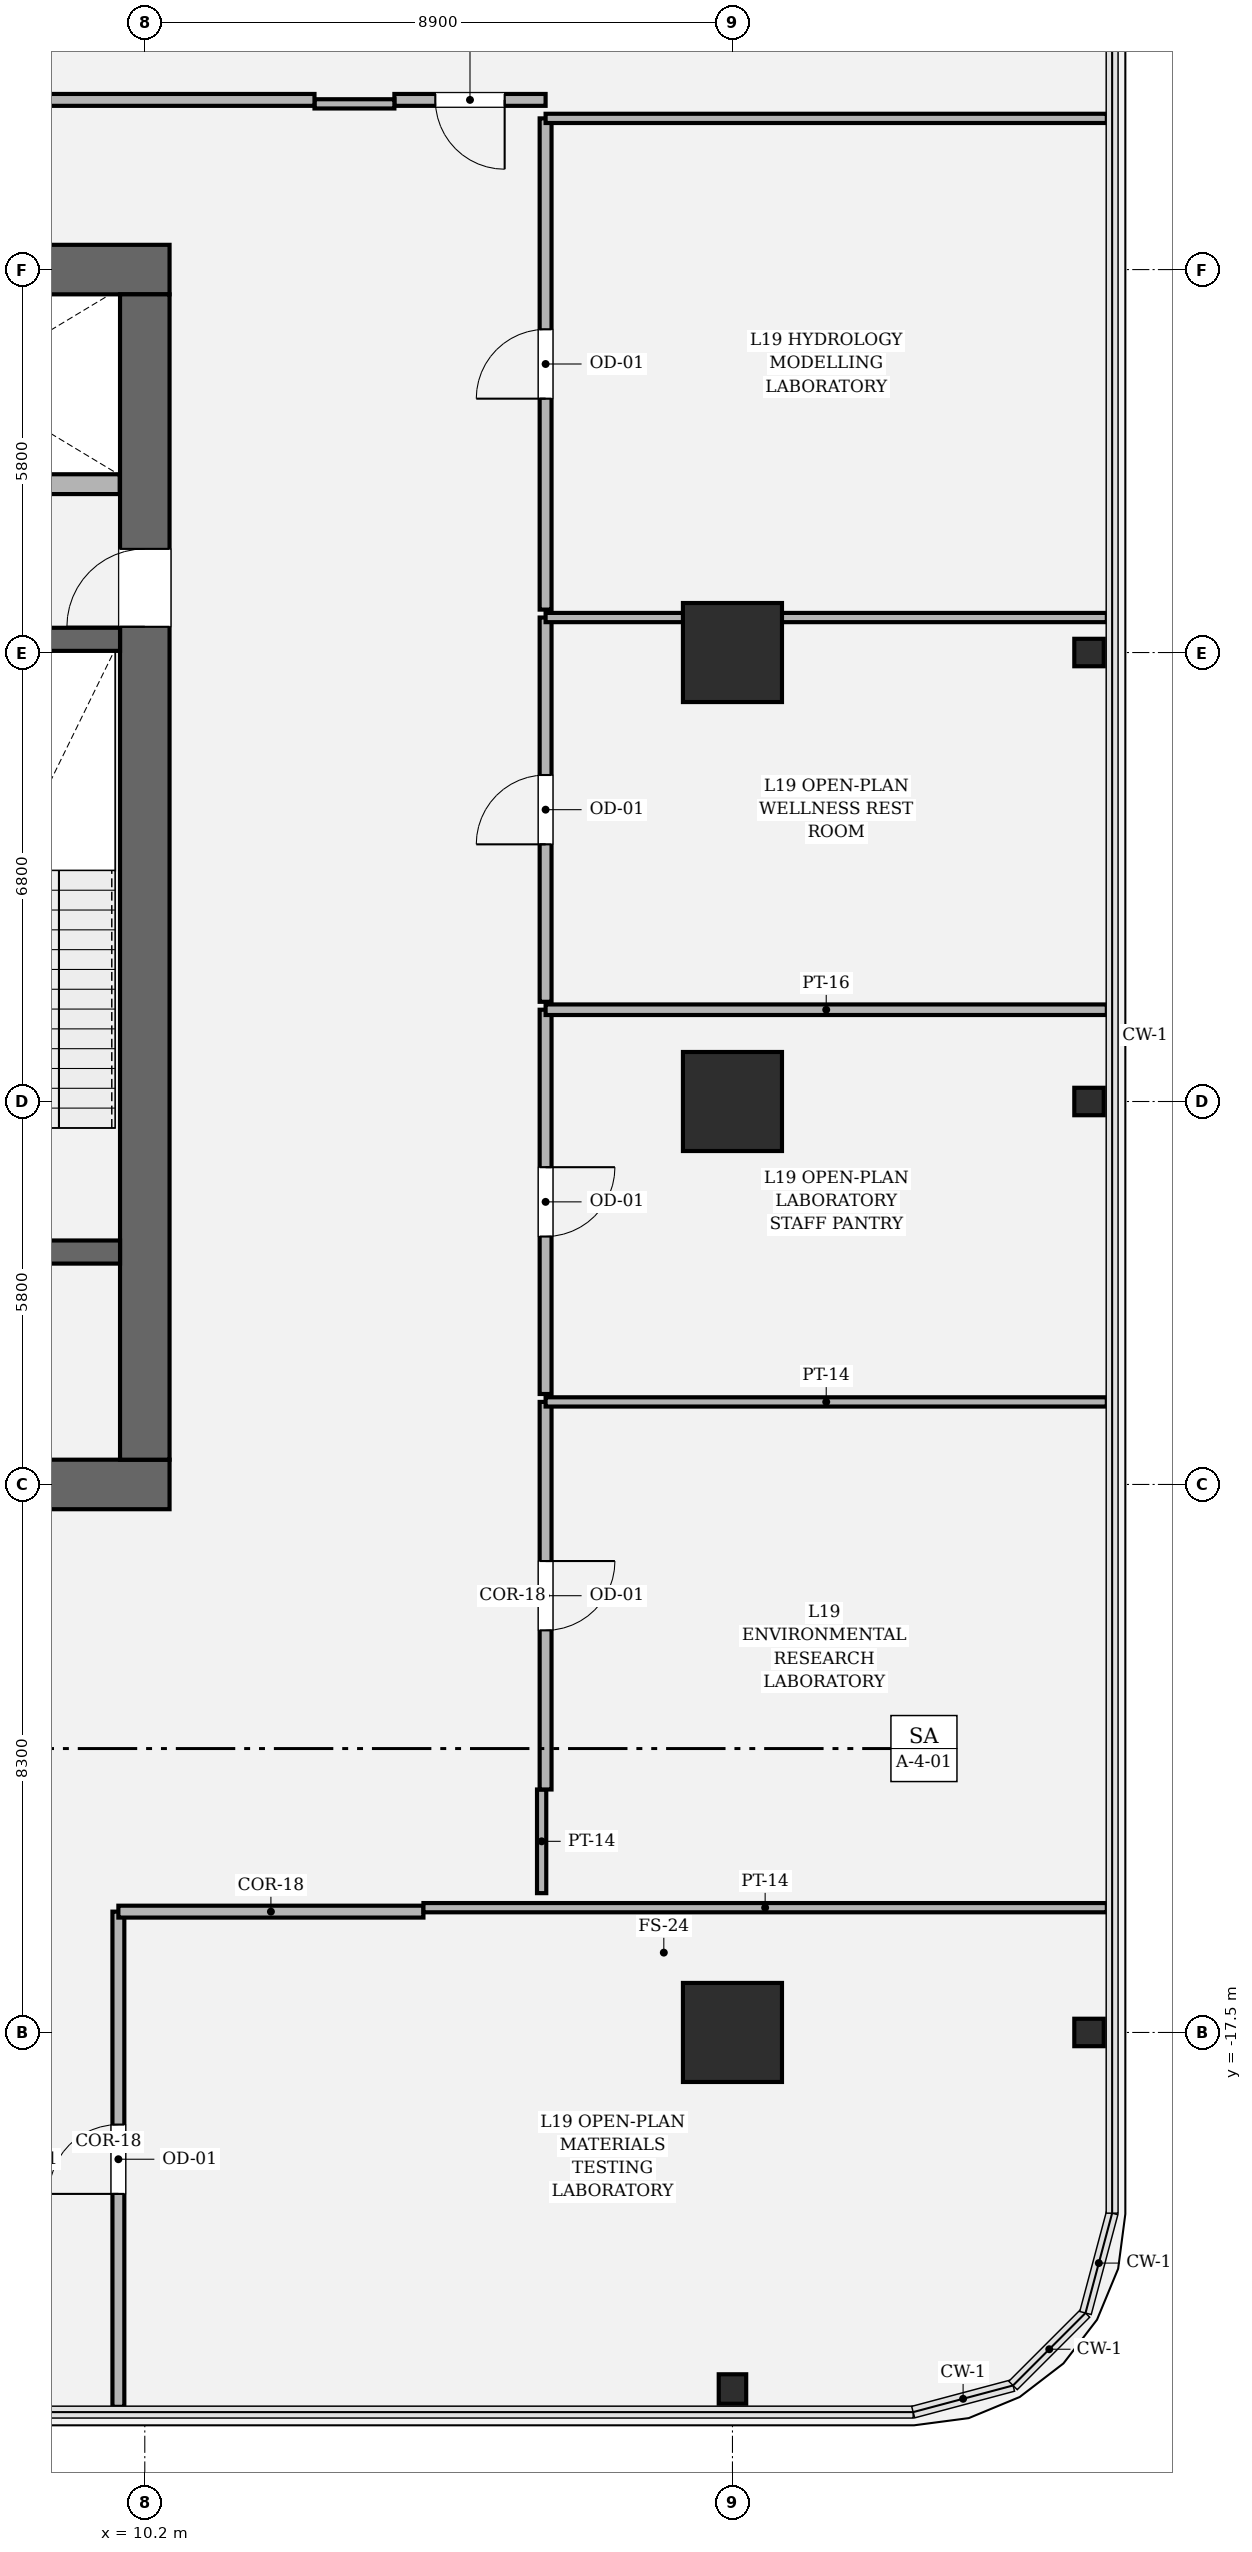
"""IFC4 building model, lengths in metres.
Left out: names, types, materials, properties, quantities, classifications, styles, units other than length and angle.
Written with IfcOpenShell. Run it as: python <this file> out.ifc"""

import sys

from ifc_helpers import new_model, si_unit, direction, frame, frame_2d, origin, origin_2d, place, context, subcontext, project, spatial, rectangle, hollow_rectangle, i_section, extrude, element, fill, save


model = new_model("IFC4")
c1 = context("Model", 3, precision=1e-05, world=origin(), true_north=direction((0.0, 1.0)))
c2 = subcontext(c1, "Body", "Model", "MODEL_VIEW")
j1 = project(units=[si_unit("LENGTHUNIT", "METRE"), si_unit("PLANEANGLEUNIT", "RADIAN")], contexts=[c1])
p1 = place(None, origin())
s1 = spatial("IfcSite", under=j1, at=p1, CompositionType="ELEMENT")
p2 = place(p1, origin())
s2 = spatial("IfcBuilding", under=s1, at=p2, CompositionType="ELEMENT")
p3 = place(p2, frame((0.0, 0.0, 84.9)))
s3 = spatial("IfcBuildingStorey", under=s2, at=p3, CompositionType="ELEMENT", Elevation=84.9)
p4 = place(p3, frame((10.575, -9.2, 0.0), z_axis=(0.0, 0.0, 1.0), x_axis=(-1.0, 0.0, 0.0)))
e1 = element("IfcWall", 1, at=p4, inside=s3, PredefinedType="SHEAR", context=c2, shape_type="SweptSolid", body=[
    extrude(rectangle(XDim=21.15, YDim=0.75, at=frame_2d((10.575, 0.0))), origin(), (0.0, 0.0, 1.0), 4.05),
])
p5 = place(p4, frame((2.85, 0.0, 0.0)))
e2 = element("IfcOpeningElement", 2, at=p5, cuts=e1, PredefinedType="OPENING", context=c2, shape_type="SweptSolid", body=[
    extrude(rectangle(XDim=1.25, YDim=2.25, at=frame_2d((0.625, 1.125))), frame((0.0, 0.385, 0.0), z_axis=(0.0, -1.0, 0.0), x_axis=(1.0, 0.0, 0.0)), (0.0, 0.0, 1.0), 0.77),
])
p6 = place(p4, frame((17.05, 0.0, 0.0)))
e3 = element("IfcOpeningElement", 3, at=p6, cuts=e1, PredefinedType="OPENING", context=c2, shape_type="SweptSolid", body=[
    extrude(rectangle(XDim=1.25, YDim=2.25, at=frame_2d((0.625, 1.125))), frame((0.0, 0.385, 0.0), z_axis=(0.0, -1.0, 0.0), x_axis=(1.0, 0.0, 0.0)), (0.0, 0.0, 1.0), 0.77),
])
p7 = place(p3, frame((-10.575, 9.2, 0.0), z_axis=(0.0, 0.0, 1.0), x_axis=(1.0, 0.0, 0.0)))
e4 = element("IfcWall", 4, at=p7, inside=s3, PredefinedType="SHEAR", context=c2, shape_type="SweptSolid", body=[
    extrude(rectangle(XDim=21.15, YDim=0.75, at=frame_2d((10.575, 0.0))), origin(), (0.0, 0.0, 1.0), 4.05),
])
p8 = place(p3, frame((10.2, 8.825, 0.0), z_axis=(0.0, 0.0, 1.0), x_axis=(0.0, -1.0, 0.0)))
e5 = element("IfcWall", 5, at=p8, inside=s3, PredefinedType="SHEAR", context=c2, shape_type="SweptSolid", body=[
    extrude(rectangle(XDim=17.65, YDim=0.75, at=frame_2d((8.825, 0.0))), origin(), (0.0, 0.0, 1.0), 4.05),
])
p9 = place(p8, frame((3.855, 0.0, 0.0)))
e6 = element("IfcOpeningElement", 6, at=p9, cuts=e5, PredefinedType="OPENING", context=c2, shape_type="SweptSolid", body=[
    extrude(rectangle(XDim=1.18, YDim=2.2, at=frame_2d((0.59, 1.1))), frame((0.0, 0.385, 0.0), z_axis=(0.0, -1.0, 0.0), x_axis=(1.0, 0.0, 0.0)), (0.0, 0.0, 1.0), 0.77),
])
p10 = place(p3, frame((4.65, -5.68, 0.0), z_axis=(0.0, 0.0, 1.0), x_axis=(1.0, 0.0, 0.0)))
e7 = element("IfcWall", 7, at=p10, inside=s3, PredefinedType="SOLIDWALL", context=c2, shape_type="SweptSolid", body=[
    extrude(rectangle(XDim=5.175, YDim=0.35, at=frame_2d((2.587, 0.0))), origin(), (0.0, 0.0, 1.0), 4.05),
])
p11 = place(p10, frame((2.71, 0.0, 0.0)))
e8 = element("IfcOpeningElement", 8, at=p11, cuts=e7, PredefinedType="OPENING", context=c2, shape_type="SweptSolid", body=[
    extrude(rectangle(XDim=1.18, YDim=2.2, at=frame_2d((0.59, 1.1))), frame((0.0, 0.185, 0.0), z_axis=(0.0, -1.0, 0.0), x_axis=(1.0, 0.0, 0.0)), (0.0, 0.0, 1.0), 0.37),
])
p12 = place(p3, frame((4.65, 3.6, 0.0), z_axis=(0.0, 0.0, 1.0), x_axis=(1.0, 0.0, 0.0)))
e9 = element("IfcWall", 9, at=p12, inside=s3, PredefinedType="SOLIDWALL", context=c2, shape_type="SweptSolid", body=[
    extrude(rectangle(XDim=5.175, YDim=0.35, at=frame_2d((2.587, 0.0))), origin(), (0.0, 0.0, 1.0), 4.05),
])
for number, where, z_axis, x_axis in (
    (10, (19.1, -17.5, 0.0), (0.0, 0.0, 1.0), (1.0, 0.0, 0.0)),
    (11, (19.1, -3.4, 0.0), (0.0, 0.0, 1.0), (1.0, 0.0, 0.0)),
    (12, (19.1, 3.4, 0.0), (0.0, 0.0, 1.0), (1.0, 0.0, 0.0)),
):
    element("IfcColumn", number, at=place(p3, frame(where, z_axis=z_axis, x_axis=x_axis)), inside=s3, PredefinedType="COLUMN", context=c2, shape_type="SweptSolid", body=[
        extrude(hollow_rectangle(XDim=1.5, YDim=1.5, WallThickness=0.045, at=origin_2d()), origin(), (0.0, 0.0, 1.0), 4.05),
    ])
for number, where, z_axis, x_axis in (
    (13, (19.1, -22.9, 0.0), (0.0, 0.0, 1.0), (1.0, 0.0, 0.0)),
    (14, (24.5, -17.5, 0.0), (0.0, 0.0, 1.0), (0.0, 1.0, 0.0)),
    (15, (24.5, -3.4, 0.0), (0.0, 0.0, 1.0), (0.0, 1.0, 0.0)),
    (16, (24.5, 3.4, 0.0), (0.0, 0.0, 1.0), (0.0, 1.0, 0.0)),
):
    element("IfcColumn", number, at=place(p3, frame(where, z_axis=z_axis, x_axis=x_axis)), inside=s3, PredefinedType="COLUMN", context=c2, shape_type="SweptSolid", body=[
        extrude(i_section(OverallWidth=0.416, OverallDepth=0.446, WebThickness=0.039, FlangeThickness=0.062, FilletRadius=0.018, at=origin_2d()), origin(), (0.0, 0.0, 1.0), 4.048),
    ])
p13 = place(p3, frame((5.06, 5.95, 0.0), z_axis=(0.0, 0.0, 1.0), x_axis=(1.0, 0.0, 0.0)))
e17 = element("IfcWall", 17, at=p13, inside=s3, PredefinedType="SOLIDWALL", context=c2, shape_type="SweptSolid", body=[
    extrude(rectangle(XDim=4.76, YDim=0.3, at=frame_2d((2.38, 0.0))), origin(), (0.0, 0.0, 1.0), 3.81),
])
p14 = place(p3, frame((9.8, -23.17, 0.0), z_axis=(0.0, 0.0, 1.0), x_axis=(0.0, 1.0, 0.0)))
e18 = element("IfcWall", 18, at=p14, inside=s3, PredefinedType="PARTITIONING", context=c2, shape_type="SweptSolid", body=[
    extrude(rectangle(XDim=7.5, YDim=0.18, at=frame_2d((3.75, 0.0))), origin(), (0.0, 0.0, 1.0), 2.524),
])
p15 = place(p14, frame((3.225, 0.0, 0.0)))
e19 = element("IfcOpeningElement", 19, at=p15, cuts=e18, PredefinedType="OPENING", context=c2, shape_type="SweptSolid", body=[
    extrude(rectangle(XDim=1.05, YDim=2.2, at=frame_2d((0.525, 1.1))), frame((0.0, 0.1, 0.0), z_axis=(0.0, -1.0, 0.0), x_axis=(1.0, 0.0, 0.0)), (0.0, 0.0, 1.0), 0.2),
])
p16 = place(p3, frame((9.8, -15.67, 0.0), z_axis=(0.0, 0.0, 1.0), x_axis=(1.0, 0.0, 0.0)))
e20 = element("IfcWall", 20, at=p16, inside=s3, PredefinedType="PARTITIONING", context=c2, shape_type="SweptSolid", body=[
    extrude(rectangle(XDim=4.62, YDim=0.18, at=frame_2d((2.31, 0.0))), origin(), (0.0, 0.0, 1.0), 3.104),
])
p17 = place(p3, frame((14.42, -15.61, 0.0), z_axis=(0.0, 0.0, 1.0), x_axis=(1.0, 0.0, 0.0)))
e21 = element("IfcWall", 21, at=p17, inside=s3, PredefinedType="PARTITIONING", context=c2, shape_type="SweptSolid", body=[
    extrude(rectangle(XDim=10.35, YDim=0.14, at=frame_2d((5.175, 0.0))), origin(), (0.0, 0.0, 1.0), 2.524),
])
p18 = place(p3, frame((16.21, -15.39, 0.0), z_axis=(0.0, 0.0, 1.0), x_axis=(0.0, 1.0, 0.0)))
e22 = element("IfcWall", 22, at=p18, inside=s3, PredefinedType="PARTITIONING", context=c2, shape_type="SweptSolid", body=[
    extrude(rectangle(XDim=1.57, YDim=0.14, at=frame_2d((0.785, 0.0))), origin(), (0.0, 0.0, 1.0), 3.81),
])
p19 = place(p3, frame((16.27, -13.82, 0.0), z_axis=(0.0, 0.0, 1.0), x_axis=(0.0, 1.0, 0.0)))
e23 = element("IfcWall", 23, at=p19, inside=s3, PredefinedType="PARTITIONING", context=c2, shape_type="SweptSolid", body=[
    extrude(rectangle(XDim=5.87, YDim=0.18, at=frame_2d((2.935, 0.0))), origin(), (0.0, 0.0, 1.0), 3.104),
])
p20 = place(p19, frame((2.41, 0.0, 0.0)))
e24 = element("IfcOpeningElement", 24, at=p20, cuts=e23, PredefinedType="OPENING", context=c2, shape_type="SweptSolid", body=[
    extrude(rectangle(XDim=1.05, YDim=2.2, at=frame_2d((0.525, 1.1))), frame((0.0, 0.1, 0.0), z_axis=(0.0, -1.0, 0.0), x_axis=(1.0, 0.0, 0.0)), (0.0, 0.0, 1.0), 0.2),
])
p21 = place(p3, frame((16.27, -7.95, 0.0), z_axis=(0.0, 0.0, 1.0), x_axis=(1.0, 0.0, 0.0)))
e25 = element("IfcWall", 25, at=p21, inside=s3, PredefinedType="PARTITIONING", context=c2, shape_type="SweptSolid", body=[
    extrude(rectangle(XDim=8.5, YDim=0.14, at=frame_2d((4.25, 0.0))), origin(), (0.0, 0.0, 1.0), 2.524),
])
p22 = place(p3, frame((16.27, -7.83, 0.0), z_axis=(0.0, 0.0, 1.0), x_axis=(0.0, 1.0, 0.0)))
e26 = element("IfcWall", 26, at=p22, inside=s3, PredefinedType="PARTITIONING", context=c2, shape_type="SweptSolid", body=[
    extrude(rectangle(XDim=5.82, YDim=0.18, at=frame_2d((2.91, 0.0))), origin(), (0.0, 0.0, 1.0), 3.104),
])
p23 = place(p22, frame((2.385, 0.0, 0.0)))
e27 = element("IfcOpeningElement", 27, at=p23, cuts=e26, PredefinedType="OPENING", context=c2, shape_type="SweptSolid", body=[
    extrude(rectangle(XDim=1.05, YDim=2.2, at=frame_2d((0.525, 1.1))), frame((0.0, 0.1, 0.0), z_axis=(0.0, -1.0, 0.0), x_axis=(1.0, 0.0, 0.0)), (0.0, 0.0, 1.0), 0.2),
])
p24 = place(p3, frame((16.27, -2.01, 0.0), z_axis=(0.0, 0.0, 1.0), x_axis=(1.0, 0.0, 0.0)))
e28 = element("IfcWall", 28, at=p24, inside=s3, PredefinedType="PARTITIONING", context=c2, shape_type="SweptSolid", body=[
    extrude(rectangle(XDim=8.5, YDim=0.16, at=frame_2d((4.25, 0.0))), origin(), (0.0, 0.0, 1.0), 2.524),
])
p25 = place(p3, frame((16.27, -1.89, 0.0), z_axis=(0.0, 0.0, 1.0), x_axis=(0.0, 1.0, 0.0)))
e29 = element("IfcWall", 29, at=p25, inside=s3, PredefinedType="PARTITIONING", context=c2, shape_type="SweptSolid", body=[
    extrude(rectangle(XDim=5.82, YDim=0.18, at=frame_2d((2.91, 0.0))), origin(), (0.0, 0.0, 1.0), 3.104),
])
p26 = place(p25, frame((2.385, 0.0, 0.0)))
e30 = element("IfcOpeningElement", 30, at=p26, cuts=e29, PredefinedType="OPENING", context=c2, shape_type="SweptSolid", body=[
    extrude(rectangle(XDim=1.05, YDim=2.2, at=frame_2d((0.525, 1.1))), frame((0.0, 0.1, 0.0), z_axis=(0.0, -1.0, 0.0), x_axis=(1.0, 0.0, 0.0)), (0.0, 0.0, 1.0), 0.2),
])
p27 = place(p3, frame((16.27, 3.93, 0.0), z_axis=(0.0, 0.0, 1.0), x_axis=(1.0, 0.0, 0.0)))
e31 = element("IfcWall", 31, at=p27, inside=s3, PredefinedType="PARTITIONING", context=c2, shape_type="SweptSolid", body=[
    extrude(rectangle(XDim=8.5, YDim=0.14, at=frame_2d((4.25, 0.0))), origin(), (0.0, 0.0, 1.0), 2.524),
])
p28 = place(p3, frame((16.27, 4.05, 0.0), z_axis=(0.0, 0.0, 1.0), x_axis=(0.0, 1.0, 0.0)))
e32 = element("IfcWall", 32, at=p28, inside=s3, PredefinedType="PARTITIONING", context=c2, shape_type="SweptSolid", body=[
    extrude(rectangle(XDim=7.44, YDim=0.18, at=frame_2d((3.72, 0.0))), origin(), (0.0, 0.0, 1.0), 3.104),
])
p29 = place(p28, frame((3.195, 0.0, 0.0)))
e33 = element("IfcOpeningElement", 33, at=p29, cuts=e32, PredefinedType="OPENING", context=c2, shape_type="SweptSolid", body=[
    extrude(rectangle(XDim=1.05, YDim=2.2, at=frame_2d((0.525, 1.1))), frame((0.0, 0.1, 0.0), z_axis=(0.0, -1.0, 0.0), x_axis=(1.0, 0.0, 0.0)), (0.0, 0.0, 1.0), 0.2),
])
p30 = place(p3, frame((16.27, 11.49, 0.0), z_axis=(0.0, 0.0, 1.0), x_axis=(1.0, 0.0, 0.0)))
e34 = element("IfcWall", 34, at=p30, inside=s3, PredefinedType="PARTITIONING", context=c2, shape_type="SweptSolid", body=[
    extrude(rectangle(XDim=8.5, YDim=0.14, at=frame_2d((4.25, 0.0))), origin(), (0.0, 0.0, 1.0), 2.524),
])
p31 = place(p3, frame((16.27, 11.77, 0.0), z_axis=(0.0, 0.0, 1.0), x_axis=(-1.0, 0.0, 0.0)))
e35 = element("IfcWall", 35, at=p31, inside=s3, PredefinedType="PARTITIONING", context=c2, shape_type="SweptSolid", body=[
    extrude(rectangle(XDim=2.29, YDim=0.18, at=frame_2d((1.145, 0.0))), origin(), (0.0, 0.0, 1.0), 3.354),
])
p32 = place(p31, frame((0.62, 0.0, 0.0)))
e36 = element("IfcOpeningElement", 36, at=p32, cuts=e35, PredefinedType="OPENING", context=c2, shape_type="SweptSolid", body=[
    extrude(rectangle(XDim=1.05, YDim=2.2, at=frame_2d((0.525, 1.1))), frame((0.0, 0.1, 0.0), z_axis=(0.0, -1.0, 0.0), x_axis=(1.0, 0.0, 0.0)), (0.0, 0.0, 1.0), 0.2),
])
p33 = place(p3, frame((13.98, 11.71, 0.0), z_axis=(0.0, 0.0, 1.0), x_axis=(-1.0, 0.0, 0.0)))
e37 = element("IfcWall", 37, at=p33, inside=s3, PredefinedType="PARTITIONING", context=c2, shape_type="SweptSolid", body=[
    extrude(rectangle(XDim=1.21, YDim=0.14, at=frame_2d((0.605, 0.0))), origin(), (0.0, 0.0, 1.0), 3.81),
])
p34 = place(p3, frame((12.77, 11.77, 0.0), z_axis=(0.0, 0.0, 1.0), x_axis=(-1.0, 0.0, 0.0)))
e38 = element("IfcWall", 38, at=p34, inside=s3, PredefinedType="PARTITIONING", context=c2, shape_type="SweptSolid", body=[
    extrude(rectangle(XDim=17.255, YDim=0.18, at=frame_2d((8.627, 0.0))), origin(), (0.0, 0.0, 1.0), 3.104),
])
p35 = place(p9, origin())
e39 = element("IfcDoor", 39, at=p35, inside=s3, OperationType="SINGLE_SWING_RIGHT", PredefinedType="DOOR", context=c2, shape_type="SweptSolid", body=[
    extrude(rectangle(XDim=1.18, YDim=2.2, at=frame_2d((0.59, 1.1))), frame((0.0, 0.025, 0.0), z_axis=(0.0, -1.0, 0.0), x_axis=(1.0, 0.0, 0.0)), (0.0, 0.0, 1.0), 0.05),
])
fill(e6, e39)
p36 = place(p15, origin())
e40 = element("IfcDoor", 40, at=p36, inside=s3, OperationType="SINGLE_SWING_LEFT", PredefinedType="DOOR", context=c2, shape_type="SweptSolid", body=[
    extrude(rectangle(XDim=1.05, YDim=2.2, at=frame_2d((0.525, 1.1))), frame((0.0, 0.025, 0.0), z_axis=(0.0, -1.0, 0.0), x_axis=(1.0, 0.0, 0.0)), (0.0, 0.0, 1.0), 0.05),
])
fill(e19, e40)
p37 = place(p20, origin())
e41 = element("IfcDoor", 41, at=p37, inside=s3, OperationType="SINGLE_SWING_RIGHT", PredefinedType="DOOR", context=c2, shape_type="SweptSolid", body=[
    extrude(rectangle(XDim=1.05, YDim=2.2, at=frame_2d((0.525, 1.1))), frame((0.0, 0.025, 0.0), z_axis=(0.0, -1.0, 0.0), x_axis=(1.0, 0.0, 0.0)), (0.0, 0.0, 1.0), 0.05),
])
fill(e24, e41)
p38 = place(p23, origin())
e42 = element("IfcDoor", 42, at=p38, inside=s3, OperationType="SINGLE_SWING_RIGHT", PredefinedType="DOOR", context=c2, shape_type="SweptSolid", body=[
    extrude(rectangle(XDim=1.05, YDim=2.2, at=frame_2d((0.525, 1.1))), frame((0.0, 0.025, 0.0), z_axis=(0.0, -1.0, 0.0), x_axis=(1.0, 0.0, 0.0)), (0.0, 0.0, 1.0), 0.05),
])
fill(e27, e42)
p39 = place(p26, origin())
e43 = element("IfcDoor", 43, at=p39, inside=s3, OperationType="SINGLE_SWING_LEFT", PredefinedType="DOOR", context=c2, shape_type="SweptSolid", body=[
    extrude(rectangle(XDim=1.05, YDim=2.2, at=frame_2d((0.525, 1.1))), frame((0.0, 0.025, 0.0), z_axis=(0.0, -1.0, 0.0), x_axis=(1.0, 0.0, 0.0)), (0.0, 0.0, 1.0), 0.05),
])
fill(e30, e43)
p40 = place(p29, origin())
e44 = element("IfcDoor", 44, at=p40, inside=s3, OperationType="SINGLE_SWING_LEFT", PredefinedType="DOOR", context=c2, shape_type="SweptSolid", body=[
    extrude(rectangle(XDim=1.05, YDim=2.2, at=frame_2d((0.525, 1.1))), frame((0.0, 0.025, 0.0), z_axis=(0.0, -1.0, 0.0), x_axis=(1.0, 0.0, 0.0)), (0.0, 0.0, 1.0), 0.05),
])
fill(e33, e44)
p41 = place(p32, origin())
e45 = element("IfcDoor", 45, at=p41, inside=s3, OperationType="SINGLE_SWING_LEFT", PredefinedType="DOOR", context=c2, shape_type="SweptSolid", body=[
    extrude(rectangle(XDim=1.05, YDim=2.2, at=frame_2d((0.525, 1.1))), frame((0.0, 0.025, 0.0), z_axis=(0.0, -1.0, 0.0), x_axis=(1.0, 0.0, 0.0)), (0.0, 0.0, 1.0), 0.05),
])
fill(e36, e45)
save(model, sys.argv[1])
